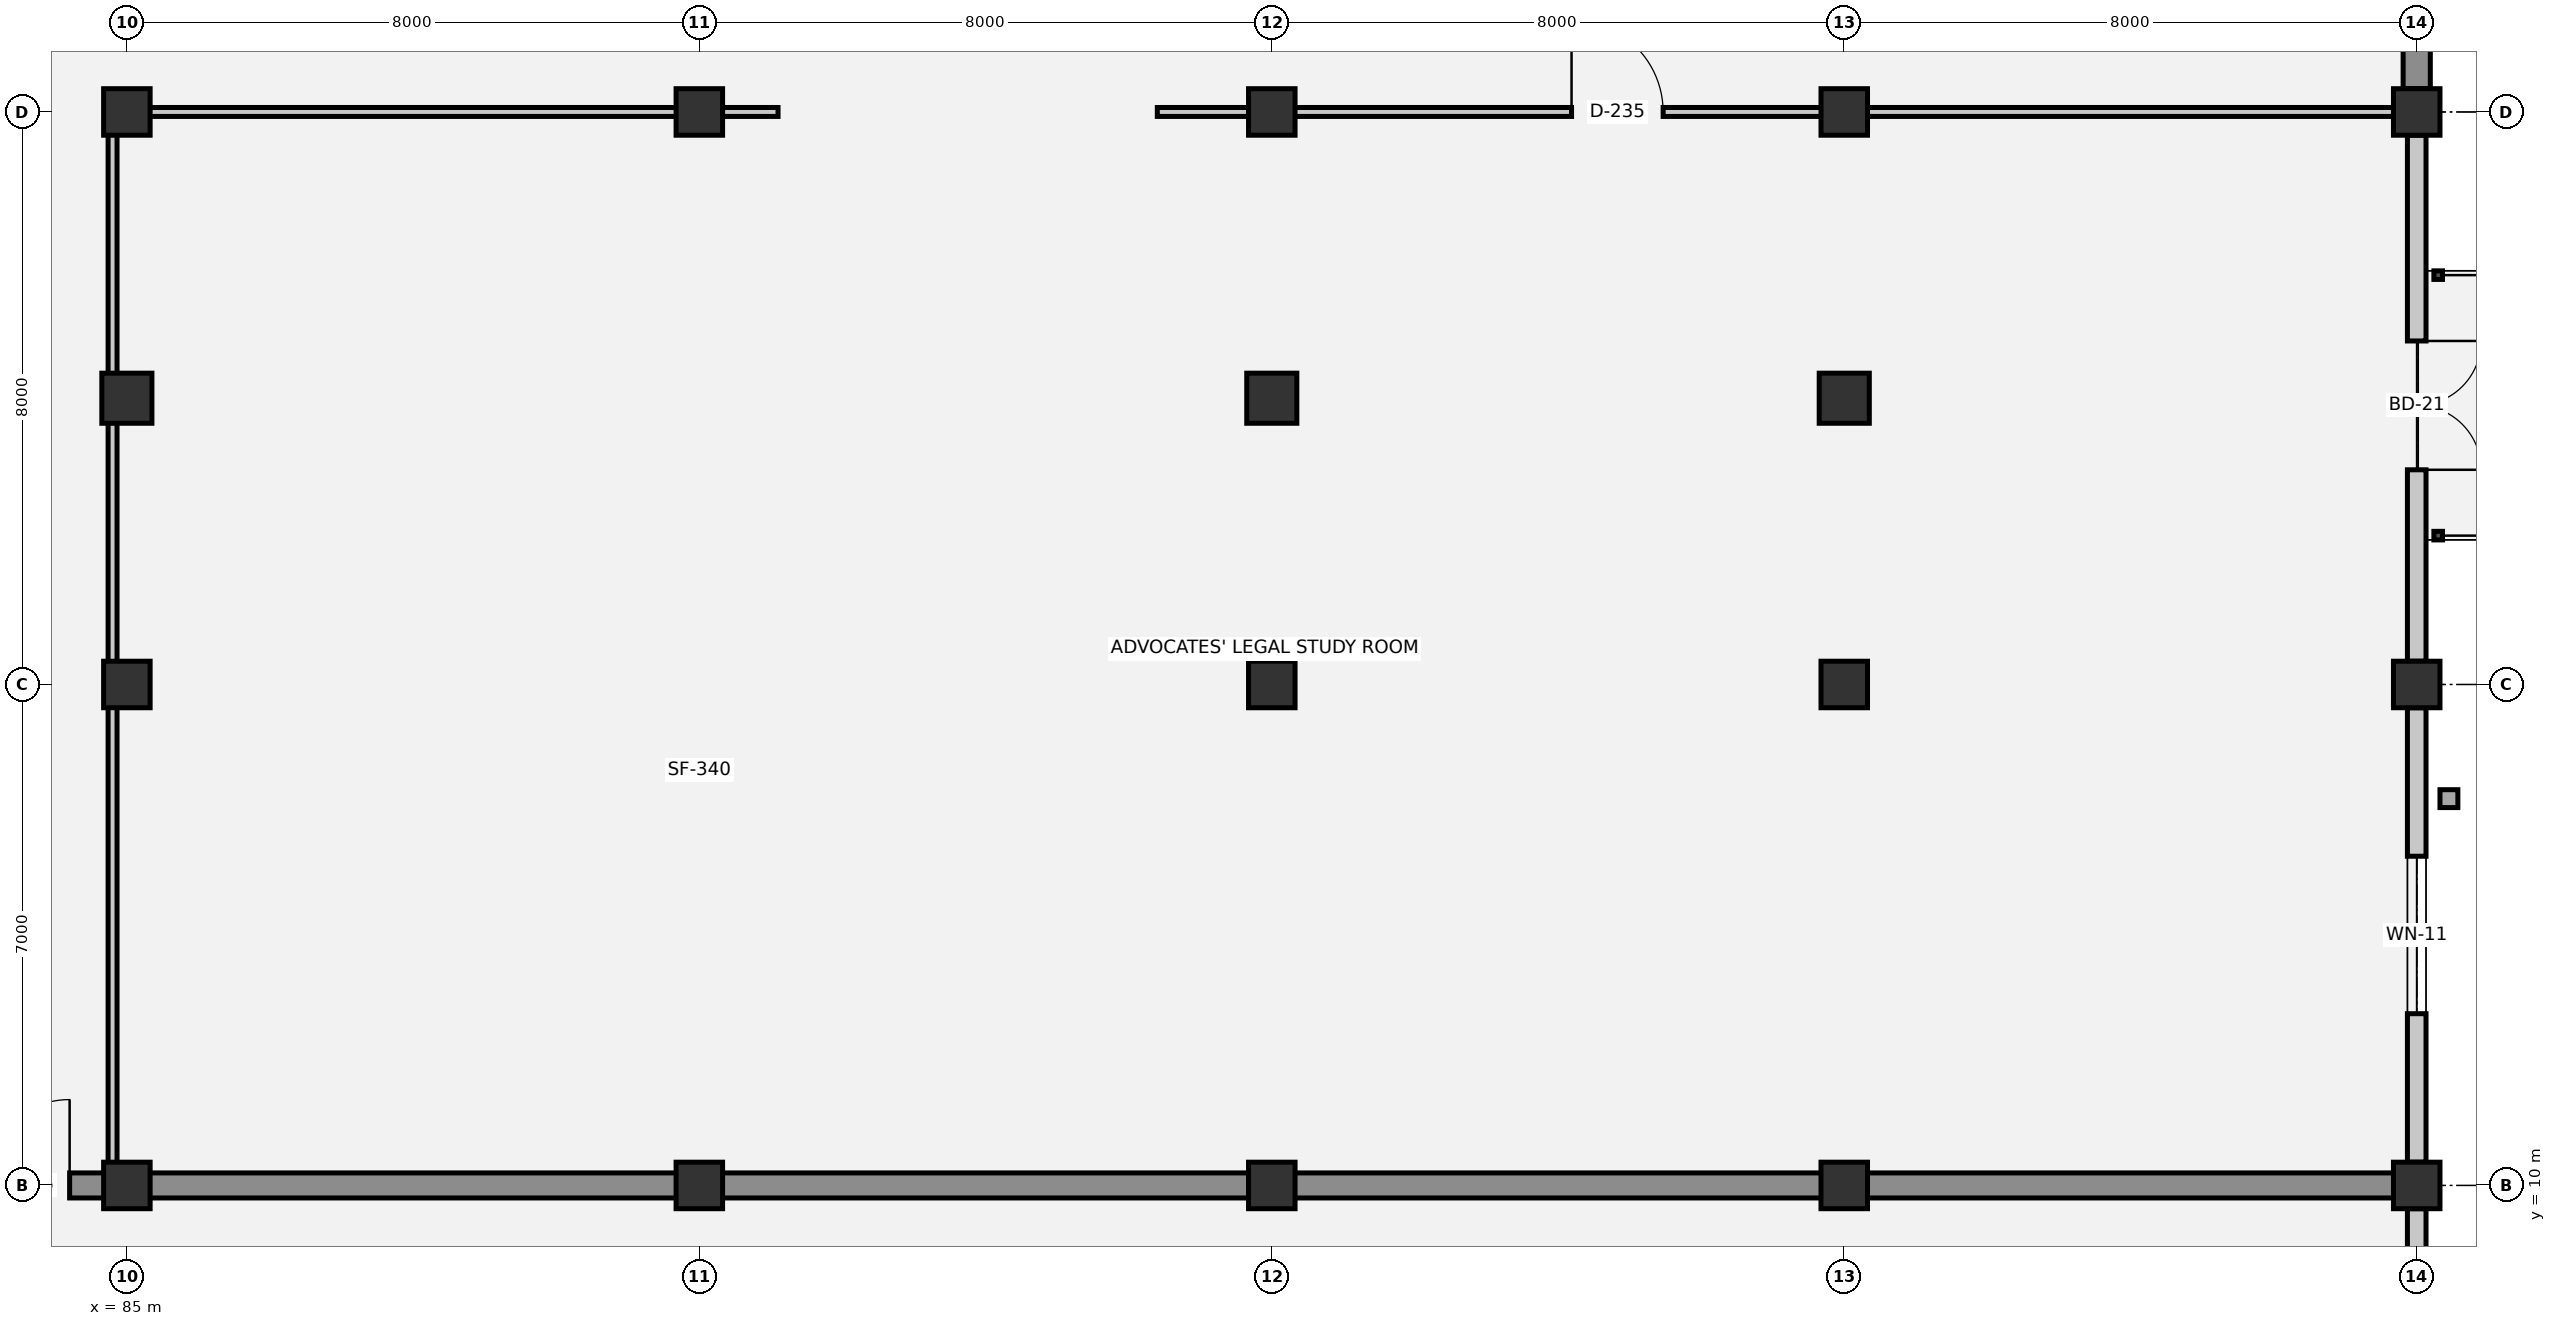
"""IFC4 building model, lengths in metres.
Left out: names, types, materials, properties, quantities, classifications, styles, units other than length and angle.
Written with IfcOpenShell. Run it as: python <this file> out.ifc"""

import sys

from ifc_helpers import new_model, si_unit, direction, frame, frame_2d, origin, origin_2d, place, context, subcontext, project, spatial, rectangle, circle, extrude, element, fill, save


model = new_model("IFC4")
c1 = context("Model", 3, precision=1e-05, world=origin(), true_north=direction((0.0, 1.0)))
c2 = subcontext(c1, "Body", "Model", "MODEL_VIEW")
j1 = project(units=[si_unit("LENGTHUNIT", "METRE"), si_unit("PLANEANGLEUNIT", "RADIAN")], contexts=[c1])
p1 = place(None, origin())
s1 = spatial("IfcSite", under=j1, at=p1, CompositionType="ELEMENT")
p2 = place(p1, origin())
s2 = spatial("IfcBuilding", under=s1, at=p2, CompositionType="ELEMENT")
p3 = place(p2, frame((0.0, 0.0, 5.4)))
s3 = spatial("IfcBuildingStorey", under=s2, at=p3, CompositionType="ELEMENT", Elevation=5.4)
for number, where, z_axis, x_axis in (
    (1, (85.0, 10.0, 0.0), (0.0, 0.0, 1.0), (1.0, 0.0, 0.0)),
    (2, (85.0, 17.0, 0.0), (0.0, 0.0, 1.0), (1.0, 0.0, 0.0)),
    (3, (85.0, 25.0, 0.0), (0.0, 0.0, 1.0), (1.0, 0.0, 0.0)),
    (4, (93.0, 10.0, 0.0), (0.0, 0.0, 1.0), (1.0, 0.0, 0.0)),
    (5, (93.0, 25.0, 0.0), (0.0, 0.0, 1.0), (1.0, 0.0, 0.0)),
    (6, (101.0, 10.0, 0.0), (0.0, 0.0, 1.0), (1.0, 0.0, 0.0)),
    (7, (101.0, 17.0, 0.0), (0.0, 0.0, 1.0), (1.0, 0.0, 0.0)),
    (8, (101.0, 25.0, 0.0), (0.0, 0.0, 1.0), (1.0, 0.0, 0.0)),
    (9, (109.0, 10.0, 0.0), (0.0, 0.0, 1.0), (1.0, 0.0, 0.0)),
    (10, (109.0, 17.0, 0.0), (0.0, 0.0, 1.0), (1.0, 0.0, 0.0)),
    (11, (109.0, 25.0, 0.0), (0.0, 0.0, 1.0), (1.0, 0.0, 0.0)),
    (12, (117.0, 10.0, 0.0), (0.0, 0.0, 1.0), (1.0, 0.0, 0.0)),
    (13, (117.0, 17.0, 0.0), (0.0, 0.0, 1.0), (1.0, 0.0, 0.0)),
    (14, (117.0, 25.0, 0.0), (0.0, 0.0, 1.0), (1.0, 0.0, 0.0)),
):
    element("IfcColumn", number, at=place(p3, frame(where, z_axis=z_axis, x_axis=x_axis)), inside=s3, PredefinedType="COLUMN", context=c2, shape_type="SweptSolid", body=[
        extrude(rectangle(XDim=0.65, YDim=0.65, at=origin_2d()), origin(), (0.0, 0.0, 1.0), 4.5),
    ])
for number, where, z_axis, x_axis in (
    (15, (85.0, 21.0, 0.0), (0.0, 0.0, 1.0), (1.0, 0.0, 0.0)),
    (16, (101.0, 21.0, 0.0), (0.0, 0.0, 1.0), (1.0, 0.0, 0.0)),
    (17, (109.0, 21.0, 0.0), (0.0, 0.0, 1.0), (1.0, 0.0, 0.0)),
):
    element("IfcColumn", number, at=place(p3, frame(where, z_axis=z_axis, x_axis=x_axis)), inside=s3, PredefinedType="COLUMN", context=c2, shape_type="SweptSolid", body=[
        extrude(circle(Radius=0.35, at=origin_2d()), origin(), (0.0, 0.0, 1.0), 4.5),
    ])
p4 = place(p3, frame((117.0, 31.675, 0.0), z_axis=(0.0, 0.0, 1.0), x_axis=(0.0, -1.0, 0.0)))
e18 = element("IfcWall", 18, at=p4, inside=s3, PredefinedType="STANDARD", context=c2, shape_type="SweptSolid", body=[
    extrude(rectangle(XDim=6.35, YDim=0.38, at=frame_2d((3.175, 0.0))), origin(), (0.0, 0.0, 1.0), 3.44),
])
p5 = place(p4, frame((1.955, 0.0, 0.95)))
e19 = element("IfcOpeningElement", 19, at=p5, cuts=e18, PredefinedType="OPENING", context=c2, shape_type="SweptSolid", body=[
    extrude(rectangle(XDim=2.05, YDim=1.85, at=frame_2d((1.025, 0.925))), frame((0.0, 0.2, 0.0), z_axis=(0.0, -1.0, 0.0), x_axis=(1.0, 0.0, 0.0)), (0.0, 0.0, 1.0), 0.4),
])
p6 = place(p3, frame((117.0, 24.675, 0.0), z_axis=(0.0, 0.0, 1.0), x_axis=(0.0, -1.0, 0.0)))
e20 = element("IfcWall", 20, at=p6, inside=s3, PredefinedType="SOLIDWALL", context=c2, shape_type="SweptSolid", body=[
    extrude(rectangle(XDim=7.35, YDim=0.26, at=frame_2d((3.675, 0.0))), origin(), (0.0, 0.0, 1.0), 3.44),
])
p7 = place(p6, frame((2.875, 0.0, 0.0)))
e21 = element("IfcOpeningElement", 21, at=p7, cuts=e20, PredefinedType="OPENING", context=c2, shape_type="SweptSolid", body=[
    extrude(rectangle(XDim=1.8, YDim=2.25, at=frame_2d((0.9, 1.125))), frame((0.0, 0.14, 0.0), z_axis=(0.0, -1.0, 0.0), x_axis=(1.0, 0.0, 0.0)), (0.0, 0.0, 1.0), 0.28),
])
p8 = place(p3, frame((117.0, 16.675, 0.0), z_axis=(0.0, 0.0, 1.0), x_axis=(0.0, -1.0, 0.0)))
e22 = element("IfcWall", 22, at=p8, inside=s3, PredefinedType="SOLIDWALL", context=c2, shape_type="SweptSolid", body=[
    extrude(rectangle(XDim=6.35, YDim=0.26, at=frame_2d((3.175, 0.0))), origin(), (0.0, 0.0, 1.0), 3.44),
])
p9 = place(p8, frame((2.075, 0.0, 0.9)))
e23 = element("IfcOpeningElement", 23, at=p9, cuts=e22, PredefinedType="OPENING", context=c2, shape_type="SweptSolid", body=[
    extrude(rectangle(XDim=2.2, YDim=1.9, at=frame_2d((1.1, 0.95))), frame((0.0, 0.14, 0.0), z_axis=(0.0, -1.0, 0.0), x_axis=(1.0, 0.0, 0.0)), (0.0, 0.0, 1.0), 0.28),
])
p10 = place(p3, frame((117.0, 9.675, 0.0), z_axis=(0.0, 0.0, 1.0), x_axis=(0.0, -1.0, 0.0)))
e24 = element("IfcWall", 24, at=p10, inside=s3, PredefinedType="SOLIDWALL", context=c2, shape_type="SweptSolid", body=[
    extrude(rectangle(XDim=5.35, YDim=0.26, at=frame_2d((2.675, 0.0))), origin(), (0.0, 0.0, 1.0), 3.44),
])
p11 = place(p10, frame((1.7, 0.0, 0.9)))
e25 = element("IfcOpeningElement", 25, at=p11, cuts=e24, PredefinedType="OPENING", context=c2, shape_type="SweptSolid", body=[
    extrude(rectangle(XDim=1.95, YDim=1.85, at=frame_2d((0.975, 0.925))), frame((0.0, 0.14, 0.0), z_axis=(0.0, -1.0, 0.0), x_axis=(1.0, 0.0, 0.0)), (0.0, 0.0, 1.0), 0.28),
])
p12 = place(p3, frame((82.48, 10.0, 0.0), z_axis=(0.0, 0.0, 1.0), x_axis=(1.0, 0.0, 0.0)))
e26 = element("IfcWall", 26, at=p12, inside=s3, PredefinedType="SHEAR", context=c2, shape_type="SweptSolid", body=[
    extrude(rectangle(XDim=2.24, YDim=0.35, at=frame_2d((1.12, 0.0))), origin(), (0.0, 0.0, 1.0), 4.14),
])
p13 = place(p12, frame((0.52, 0.0, 0.0)))
e27 = element("IfcOpeningElement", 27, at=p13, cuts=e26, PredefinedType="OPENING", context=c2, shape_type="SweptSolid", body=[
    extrude(rectangle(XDim=1.2, YDim=2.15, at=frame_2d((0.6, 1.075))), frame((0.0, 0.185, 0.0), z_axis=(0.0, -1.0, 0.0), x_axis=(1.0, 0.0, 0.0)), (0.0, 0.0, 1.0), 0.37),
])
p14 = place(p3, frame((84.88, 10.0, 0.0), z_axis=(0.0, 0.0, 1.0), x_axis=(1.0, 0.0, 0.0)))
e28 = element("IfcWall", 28, at=p14, inside=s3, PredefinedType="SHEAR", context=c2, shape_type="SweptSolid", body=[
    extrude(rectangle(XDim=32.04, YDim=0.35, at=frame_2d((16.02, 0.0))), origin(), (0.0, 0.0, 1.0), 4.14),
])
p15 = place(p3, frame((84.88, 25.0, 0.0), z_axis=(0.0, 0.0, 1.0), x_axis=(1.0, 0.0, 0.0)))
e29 = element("IfcWall", 29, at=p15, inside=s3, PredefinedType="PARTITIONING", context=c2, shape_type="SweptSolid", body=[
    extrude(rectangle(XDim=9.22, YDim=0.125, at=frame_2d((4.61, 0.0))), origin(), (0.0, 0.0, 1.0), 3.46),
])
p16 = place(p3, frame((99.4, 25.0, 0.0), z_axis=(0.0, 0.0, 1.0), x_axis=(1.0, 0.0, 0.0)))
e30 = element("IfcWall", 30, at=p16, inside=s3, PredefinedType="PARTITIONING", context=c2, shape_type="SweptSolid", body=[
    extrude(rectangle(XDim=17.52, YDim=0.125, at=frame_2d((8.76, 0.0))), origin(), (0.0, 0.0, 1.0), 3.46),
])
p17 = place(p16, frame((5.789, 0.0, 0.0)))
e31 = element("IfcOpeningElement", 31, at=p17, cuts=e30, PredefinedType="OPENING", context=c2, shape_type="SweptSolid", body=[
    extrude(rectangle(XDim=1.28, YDim=2.2, at=frame_2d((0.64, 1.1))), frame((0.0, 0.073, 0.0), z_axis=(0.0, -1.0, 0.0), x_axis=(1.0, 0.0, 0.0)), (0.0, 0.0, 1.0), 0.145),
])
p18 = place(p3, frame((84.8, 10.08, 0.0), z_axis=(0.0, 0.0, 1.0), x_axis=(0.0, 1.0, 0.0)))
e32 = element("IfcWall", 32, at=p18, inside=s3, PredefinedType="PARTITIONING", context=c2, shape_type="SweptSolid", body=[
    extrude(rectangle(XDim=14.84, YDim=0.125, at=frame_2d((7.42, 0.0))), origin(), (0.0, 0.0, 1.0), 3.61),
])
p19 = place(p7, origin())
e33 = element("IfcDoor", 33, at=p19, inside=s3, OperationType="DOUBLE_DOOR_SINGLE_SWING", PredefinedType="DOOR", context=c2, shape_type="SweptSolid", body=[
    extrude(rectangle(XDim=1.8, YDim=2.25, at=frame_2d((0.9, 1.125))), frame((0.0, 0.025, 0.0), z_axis=(0.0, -1.0, 0.0), x_axis=(1.0, 0.0, 0.0)), (0.0, 0.0, 1.0), 0.05),
])
fill(e21, e33)
p20 = place(p9, origin())
e34 = element("IfcWindow", 34, at=p20, inside=s3, PartitioningType="SINGLE_PANEL", PredefinedType="WINDOW", context=c2, shape_type="SweptSolid", body=[
    extrude(rectangle(XDim=2.2, YDim=1.9, at=frame_2d((1.1, 0.95))), frame((0.0, 0.03, 0.0), z_axis=(0.0, -1.0, 0.0), x_axis=(1.0, 0.0, 0.0)), (0.0, 0.0, 1.0), 0.06),
])
fill(e23, e34)
p21 = place(p17, origin())
e35 = element("IfcDoor", 35, at=p21, inside=s3, OperationType="SINGLE_SWING_LEFT", PredefinedType="DOOR", context=c2, shape_type="SweptSolid", body=[
    extrude(rectangle(XDim=1.28, YDim=2.2, at=frame_2d((0.64, 1.1))), frame((0.0, 0.025, 0.0), z_axis=(0.0, -1.0, 0.0), x_axis=(1.0, 0.0, 0.0)), (0.0, 0.0, 1.0), 0.05),
])
fill(e31, e35)
p22 = place(p13, origin())
e36 = element("IfcDoor", 36, at=p22, inside=s3, OperationType="SINGLE_SWING_RIGHT", PredefinedType="DOOR", context=c2, shape_type="SweptSolid", body=[
    extrude(rectangle(XDim=1.2, YDim=2.15, at=frame_2d((0.6, 1.075))), frame((0.0, 0.025, 0.0), z_axis=(0.0, -1.0, 0.0), x_axis=(1.0, 0.0, 0.0)), (0.0, 0.0, 1.0), 0.05),
])
fill(e27, e36)
save(model, sys.argv[1])
